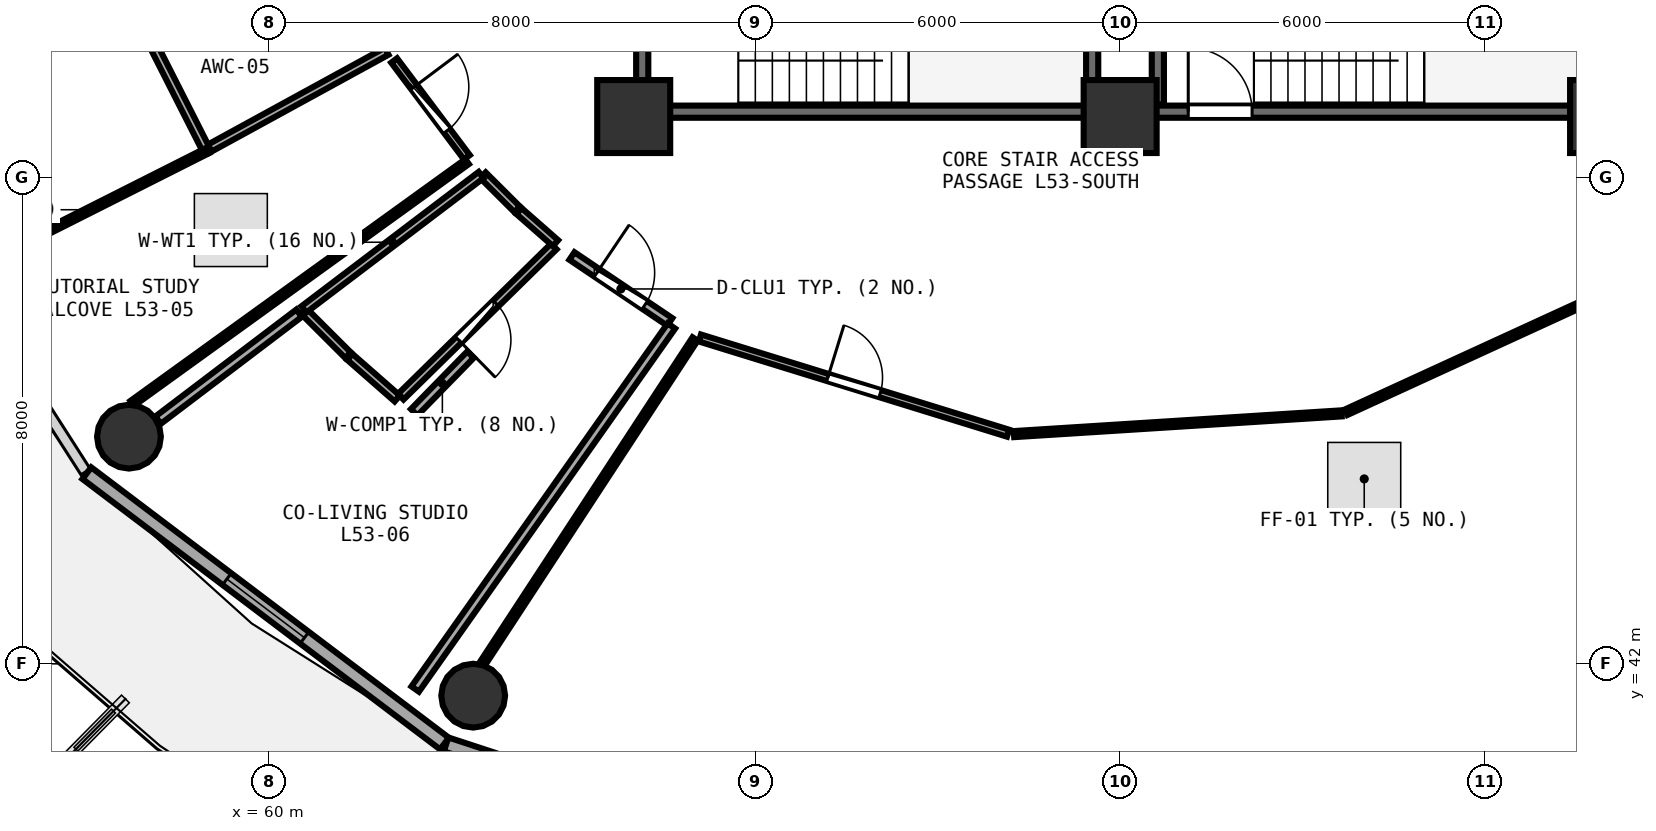
"""IFC4 building model, lengths in metres.
Left out: names, types, materials, properties, quantities, classifications, styles, units other than length and angle.
Written with IfcOpenShell. Run it as: python <this file> out.ifc"""

import sys

from ifc_helpers import new_model, si_unit, direction, frame, frame_2d, origin, origin_2d, place, context, subcontext, project, spatial, rectangle, circle, extrude, element, fill, save


model = new_model("IFC4")
c1 = context("Model", 3, precision=1e-05, world=origin(), true_north=direction((0.0, 1.0)))
c2 = subcontext(c1, "Body", "Model", "MODEL_VIEW")
j1 = project(units=[si_unit("LENGTHUNIT", "METRE"), si_unit("PLANEANGLEUNIT", "RADIAN")], contexts=[c1])
p1 = place(None, origin())
s1 = spatial("IfcSite", under=j1, at=p1, CompositionType="ELEMENT")
p2 = place(p1, origin())
s2 = spatial("IfcBuilding", under=s1, at=p2, CompositionType="ELEMENT")
p3 = place(p2, frame((0.0, 0.0, 208.2)))
s3 = spatial("IfcBuildingStorey", under=s2, at=p3, CompositionType="ELEMENT", Elevation=208.2)
for number, where, z_axis, x_axis in (
    (1, (66.0, 51.0, 0.0), (0.0, 0.0, 1.0), (1.0, 0.0, 0.0)),
    (2, (74.0, 51.0, 0.0), (0.0, 0.0, 1.0), (1.0, 0.0, 0.0)),
    (3, (82.0, 51.0, 0.0), (0.0, 0.0, 1.0), (1.0, 0.0, 0.0)),
):
    element("IfcColumn", number, at=place(p3, frame(where, z_axis=z_axis, x_axis=x_axis)), inside=s3, PredefinedType="PILASTER", context=c2, shape_type="SweptSolid", body=[
        extrude(rectangle(XDim=1.2, YDim=1.2, at=origin_2d()), origin(), (0.0, 0.0, 1.0), 3.75),
    ])
for number, where, z_axis, x_axis in (
    (4, (57.698, 45.736, 0.0), (0.0, 0.0, 1.0), (1.0, 0.0, 0.0)),
    (5, (63.36, 41.476, 0.0), (0.0, 0.0, 1.0), (1.0, 0.0, 0.0)),
):
    element("IfcColumn", number, at=place(p3, frame(where, z_axis=z_axis, x_axis=x_axis)), inside=s3, PredefinedType="COLUMN", context=c2, shape_type="SweptSolid", body=[
        extrude(circle(Radius=0.525, at=origin_2d()), origin(), (0.0, 0.0, 1.0), 3.75),
    ])
p4 = place(p3, frame((57.006, 45.135, 0.0), z_axis=(0.0, 0.0, 1.0), x_axis=(0.797701674595, -0.603052268338, 0.0)))
e6 = element("IfcWall", 6, at=p4, inside=s3, PredefinedType="SOLIDWALL", context=c2, shape_type="SweptSolid", body=[
    extrude(rectangle(XDim=7.374, YDim=0.24, at=frame_2d((3.687, 0.0))), origin(), (0.0, 0.0, 1.0), 3.475),
])
p5 = place(p4, frame((2.887, 0.0, 0.85)))
e7 = element("IfcOpeningElement", 7, at=p5, cuts=e6, PredefinedType="OPENING", context=c2, shape_type="SweptSolid", body=[
    extrude(rectangle(XDim=1.6, YDim=1.45, at=frame_2d((0.8, 0.725))), frame((0.0, 0.13, 0.0), z_axis=(0.0, -1.0, 0.0), x_axis=(1.0, 0.0, 0.0)), (0.0, 0.0, 1.0), 0.26),
])
p6 = place(p3, frame((62.914, 40.675, 0.0), z_axis=(0.0, 0.0, 1.0), x_axis=(0.95022142767, -0.31157541366, 0.0)))
e8 = element("IfcWall", 8, at=p6, inside=s3, PredefinedType="SOLIDWALL", context=c2, shape_type="SweptSolid", body=[
    extrude(rectangle(XDim=7.594, YDim=0.24, at=frame_2d((3.797, 0.0))), origin(), (0.0, 0.0, 1.0), 3.475),
])
p7 = place(p6, frame((2.997, 0.0, 0.85)))
e9 = element("IfcOpeningElement", 9, at=p7, cuts=e8, PredefinedType="OPENING", context=c2, shape_type="SweptSolid", body=[
    extrude(rectangle(XDim=1.6, YDim=1.45, at=frame_2d((0.8, 0.725))), frame((0.0, 0.13, 0.0), z_axis=(0.0, -1.0, 0.0), x_axis=(1.0, 0.0, 0.0)), (0.0, 0.0, 1.0), 0.26),
])
p8 = place(p3, frame((74.0, 51.08, 0.0), z_axis=(0.0, 0.0, 1.0), x_axis=(1.0, 0.0, 0.0)))
e10 = element("IfcWall", 10, at=p8, inside=s3, PredefinedType="SHEAR", context=c2, shape_type="SweptSolid", body=[
    extrude(rectangle(XDim=7.9, YDim=0.2, at=frame_2d((3.95, 0.0))), origin(), (0.0, 0.0, 1.0), 3.49),
])
p9 = place(p8, frame((1.12, 0.0, 0.0)))
e11 = element("IfcOpeningElement", 11, at=p9, cuts=e10, PredefinedType="OPENING", context=c2, shape_type="SweptSolid", body=[
    extrude(rectangle(XDim=1.05, YDim=2.1, at=frame_2d((0.525, 1.05))), frame((0.0, 0.11, 0.0), z_axis=(0.0, -1.0, 0.0), x_axis=(1.0, 0.0, 0.0)), (0.0, 0.0, 1.0), 0.22),
])
p10 = place(p3, frame((74.62, 54.27, 0.0), z_axis=(0.0, 0.0, 1.0), x_axis=(0.0, -1.0, 0.0)))
e12 = element("IfcWall", 12, at=p10, inside=s3, PredefinedType="SHEAR", context=c2, shape_type="SweptSolid", body=[
    extrude(rectangle(XDim=3.07, YDim=0.2, at=frame_2d((1.535, 0.0))), origin(), (0.0, 0.0, 1.0), 3.49),
])
p11 = place(p3, frame((66.26, 51.08, 0.0), z_axis=(0.0, 0.0, 1.0), x_axis=(1.0, 0.0, 0.0)))
e13 = element("IfcWall", 13, at=p11, inside=s3, PredefinedType="SHEAR", context=c2, shape_type="SweptSolid", body=[
    extrude(rectangle(XDim=7.16, YDim=0.2, at=frame_2d((3.58, 0.0))), origin(), (0.0, 0.0, 1.0), 3.49),
])
p12 = place(p3, frame((73.54, 51.2, 0.0), z_axis=(0.0, 0.0, 1.0), x_axis=(0.0, 1.0, 0.0)))
e14 = element("IfcWall", 14, at=p12, inside=s3, PredefinedType="SHEAR", context=c2, shape_type="SweptSolid", body=[
    extrude(rectangle(XDim=3.07, YDim=0.2, at=frame_2d((1.535, 0.0))), origin(), (0.0, 0.0, 1.0), 3.49),
])
p13 = place(p3, frame((66.14, 54.27, 0.0), z_axis=(0.0, 0.0, 1.0), x_axis=(0.0, -1.0, 0.0)))
e15 = element("IfcWall", 15, at=p13, inside=s3, PredefinedType="SHEAR", context=c2, shape_type="SweptSolid", body=[
    extrude(rectangle(XDim=3.07, YDim=0.2, at=frame_2d((1.535, 0.0))), origin(), (0.0, 0.0, 1.0), 3.49),
])
p14 = place(p13, frame((1.01, 0.0, 0.0)))
e16 = element("IfcOpeningElement", 16, at=p14, cuts=e15, PredefinedType="OPENING", context=c2, shape_type="SweptSolid", body=[
    extrude(rectangle(XDim=1.05, YDim=2.1, at=frame_2d((0.525, 1.05))), frame((0.0, 0.11, 0.0), z_axis=(0.0, -1.0, 0.0), x_axis=(1.0, 0.0, 0.0)), (0.0, 0.0, 1.0), 0.22),
])
p15 = place(p3, frame((67.088, 47.358, 0.0), z_axis=(0.0, 0.0, 1.0), x_axis=(0.955451026591, -0.295149683696, 0.0)))
e17 = element("IfcWall", 17, at=p15, inside=s3, PredefinedType="PARTITIONING", context=c2, shape_type="SweptSolid", body=[
    extrude(rectangle(XDim=5.305, YDim=0.12, at=frame_2d((2.652, 0.0))), origin(), (0.0, 0.0, 1.0), 3.235),
])
p16 = place(p15, frame((2.202, 0.0, 0.0)))
e18 = element("IfcOpeningElement", 18, at=p16, cuts=e17, PredefinedType="OPENING", context=c2, shape_type="SweptSolid", body=[
    extrude(rectangle(XDim=0.9, YDim=2.08, at=frame_2d((0.45, 1.04))), frame((0.0, 0.07, 0.0), z_axis=(0.0, -1.0, 0.0), x_axis=(1.0, 0.0, 0.0)), (0.0, 0.0, 1.0), 0.14),
])
p17 = place(p3, frame((62.06, 51.922, 0.0), z_axis=(0.0, 0.0, 1.0), x_axis=(0.600647163637, -0.799514218019, 0.0)))
e19 = element("IfcWall", 19, at=p17, inside=s3, PredefinedType="PARTITIONING", context=c2, shape_type="SweptSolid", body=[
    extrude(rectangle(XDim=1.991, YDim=0.12, at=frame_2d((0.996, 0.0))), origin(), (0.0, 0.0, 1.0), 3.025),
])
p18 = place(p17, frame((0.546, 0.0, 0.0)))
e20 = element("IfcOpeningElement", 20, at=p18, cuts=e19, PredefinedType="OPENING", context=c2, shape_type="SweptSolid", body=[
    extrude(rectangle(XDim=0.9, YDim=2.08, at=frame_2d((0.45, 1.04))), frame((0.0, 0.07, 0.0), z_axis=(0.0, -1.0, 0.0), x_axis=(1.0, 0.0, 0.0)), (0.0, 0.0, 1.0), 0.14),
])
p19 = place(p3, frame((64.686, 48.863, 0.0), z_axis=(0.0, 0.0, 1.0), x_axis=(-0.713685369918, -0.700466410875, 0.0)))
e21 = element("IfcWall", 21, at=p19, inside=s3, PredefinedType="PLUMBINGWALL", context=c2, shape_type="SweptSolid", body=[
    extrude(rectangle(XDim=3.528, YDim=0.13, at=frame_2d((1.764, 0.0))), origin(), (0.0, 0.0, 1.0), 3.175),
])
p20 = place(p19, frame((1.334, 0.0, 0.0)))
e22 = element("IfcOpeningElement", 22, at=p20, cuts=e21, PredefinedType="OPENING", context=c2, shape_type="SweptSolid", body=[
    extrude(rectangle(XDim=0.86, YDim=2.05, at=frame_2d((0.43, 1.025))), frame((0.0, 0.075, 0.0), z_axis=(0.0, -1.0, 0.0), x_axis=(1.0, 0.0, 0.0)), (0.0, 0.0, 1.0), 0.15),
])
p21 = place(p3, frame((64.984, 48.707, 0.0), z_axis=(0.0, 0.0, 1.0), x_axis=(0.829408373073, -0.558642775553, 0.0)))
e23 = element("IfcWall", 23, at=p21, inside=s3, PredefinedType="PARTITIONING", context=c2, shape_type="SweptSolid", body=[
    extrude(rectangle(XDim=1.94, YDim=0.15, at=frame_2d((0.97, 0.0))), origin(), (0.0, 0.0, 1.0), 3.025),
])
p22 = place(p21, frame((0.495, 0.0, 0.0)))
e24 = element("IfcOpeningElement", 24, at=p22, cuts=e23, PredefinedType="OPENING", context=c2, shape_type="SweptSolid", body=[
    extrude(rectangle(XDim=0.95, YDim=2.08, at=frame_2d((0.475, 1.04))), frame((0.0, 0.085, 0.0), z_axis=(0.0, -1.0, 0.0), x_axis=(1.0, 0.0, 0.0)), (0.0, 0.0, 1.0), 0.17),
])
p23 = place(p3, frame((72.254, 45.778, 0.0), z_axis=(0.0, 0.0, 1.0), x_axis=(0.99800477295, 0.063138523658, 0.0)))
e25 = element("IfcWall", 25, at=p23, inside=s3, PredefinedType="PARTITIONING", context=c2, shape_type="SweptSolid", body=[
    extrude(rectangle(XDim=5.398, YDim=0.1, at=frame_2d((2.699, 0.0))), origin(), (0.0, 0.0, 1.0), 3.025),
])
p24 = place(p3, frame((77.717, 46.138, 0.0), z_axis=(0.0, 0.0, 1.0), x_axis=(0.908908137454, 0.416996400069, 0.0)))
e26 = element("IfcWall", 26, at=p24, inside=s3, PredefinedType="PARTITIONING", context=c2, shape_type="SweptSolid", body=[
    extrude(rectangle(XDim=5.289, YDim=0.1, at=frame_2d((2.645, 0.0))), origin(), (0.0, 0.0, 1.0), 3.235),
])
p25 = place(p3, frame((63.514, 42.004, 0.0), z_axis=(0.0, 0.0, 1.0), x_axis=(0.547776057645, 0.836625000028, 0.0)))
e27 = element("IfcWall", 27, at=p25, inside=s3, PredefinedType="PARTITIONING", context=c2, shape_type="SweptSolid", body=[
    extrude(rectangle(XDim=6.381, YDim=0.1, at=frame_2d((3.19, 0.0))), origin(), (0.0, 0.0, 1.0), 3.025),
])
p26 = place(p3, frame((61.052, 53.791, 0.0), z_axis=(0.0, 0.0, 1.0), x_axis=(-0.950863645771, -0.309609959708, 0.0)))
e28 = element("IfcWall", 28, at=p26, inside=s3, PredefinedType="PARTITIONING", context=c2, shape_type="SweptSolid", body=[
    extrude(rectangle(XDim=6.87, YDim=0.1, at=frame_2d((3.435, 0.0))), origin(), (0.0, 0.0, 1.0), 3.175),
])
p27 = place(p3, frame((61.937, 52.073, 0.0), z_axis=(0.0, 0.0, 1.0), x_axis=(-0.877295143091, -0.479951280767, 0.0)))
e29 = element("IfcWall", 29, at=p27, inside=s3, PredefinedType="PLUMBINGWALL", context=c2, shape_type="SweptSolid", body=[
    extrude(rectangle(XDim=3.36, YDim=0.13, at=frame_2d((1.68, 0.0))), origin(), (0.0, 0.0, 1.0), 3.025),
])
p28 = place(p3, frame((58.962, 50.469, 0.0), z_axis=(0.0, 0.0, 1.0), x_axis=(-0.452384505313, 0.891822997771, 0.0)))
e30 = element("IfcWall", 30, at=p28, inside=s3, PredefinedType="PLUMBINGWALL", context=c2, shape_type="SweptSolid", body=[
    extrude(rectangle(XDim=2.018, YDim=0.13, at=frame_2d((1.009, 0.0))), origin(), (0.0, 0.0, 1.0), 3.025),
])
p29 = place(p3, frame((63.26, 50.259, 0.0), z_axis=(0.0, 0.0, 1.0), x_axis=(-0.810850730514, -0.585253016076, 0.0)))
e31 = element("IfcWall", 31, at=p29, inside=s3, PredefinedType="PARTITIONING", context=c2, shape_type="SweptSolid", body=[
    extrude(rectangle(XDim=6.793, YDim=0.1, at=frame_2d((3.396, 0.0))), origin(), (0.0, 0.0, 1.0), 3.175),
])
p30 = place(p3, frame((55.125, 48.491, 0.0), z_axis=(0.0, 0.0, 1.0), x_axis=(0.892902240534, 0.450250584507, 0.0)))
e32 = element("IfcWall", 32, at=p30, inside=s3, PredefinedType="PARTITIONING", context=c2, shape_type="SweptSolid", body=[
    extrude(rectangle(XDim=4.337, YDim=0.1, at=frame_2d((2.169, 0.0))), origin(), (0.0, 0.0, 1.0), 3.075),
])
p31 = place(p3, frame((63.519, 50.036, 0.0), z_axis=(0.0, 0.0, 1.0), x_axis=(0.708179895313, -0.706032036012, 0.0)))
e33 = element("IfcWall", 33, at=p31, inside=s3, PredefinedType="PLUMBINGWALL", context=c2, shape_type="SweptSolid", body=[
    extrude(rectangle(XDim=0.796, YDim=0.13, at=frame_2d((0.398, 0.0))), origin(), (0.0, 0.0, 1.0), 3.025),
])
p32 = place(p3, frame((64.112, 49.447, 0.0), z_axis=(0.0, 0.0, 1.0), x_axis=(0.751480759656, -0.659755005943, 0.0)))
e34 = element("IfcWall", 34, at=p32, inside=s3, PredefinedType="PLUMBINGWALL", context=c2, shape_type="SweptSolid", body=[
    extrude(rectangle(XDim=0.801, YDim=0.13, at=frame_2d((0.401, 0.0))), origin(), (0.0, 0.0, 1.0), 3.48),
])
p33 = place(p3, frame((62.111, 46.363, 0.0), z_axis=(0.0, 0.0, 1.0), x_axis=(-0.751599507382, 0.659619724162, 0.0)))
e35 = element("IfcWall", 35, at=p33, inside=s3, PredefinedType="PLUMBINGWALL", context=c2, shape_type="SweptSolid", body=[
    extrude(rectangle(XDim=1.038, YDim=0.13, at=frame_2d((0.519, 0.0))), origin(), (0.0, 0.0, 1.0), 3.48),
])
p34 = place(p3, frame((61.302, 47.075, 0.0), z_axis=(0.0, 0.0, 1.0), x_axis=(-0.707936648292, 0.706275938996, 0.0)))
e36 = element("IfcWall", 36, at=p34, inside=s3, PredefinedType="PLUMBINGWALL", context=c2, shape_type="SweptSolid", body=[
    extrude(rectangle(XDim=1.029, YDim=0.13, at=frame_2d((0.515, 0.0))), origin(), (0.0, 0.0, 1.0), 3.025),
])
p35 = place(p3, frame((60.575, 47.828, 0.0), z_axis=(0.0, 0.0, 1.0), x_axis=(0.79681650582, 0.604221363453, 0.0)))
e37 = element("IfcWall", 37, at=p35, inside=s3, PredefinedType="PLUMBINGWALL", context=c2, shape_type="SweptSolid", body=[
    extrude(rectangle(XDim=3.657, YDim=0.13, at=frame_2d((1.829, 0.0))), origin(), (0.0, 0.0, 1.0), 3.175),
])
p36 = place(p3, frame((66.62, 47.556, 0.0), z_axis=(0.0, 0.0, 1.0), x_axis=(-0.576552043051, -0.817060427174, 0.0)))
e38 = element("IfcWall", 38, at=p36, inside=s3, PredefinedType="PARTITIONING", context=c2, shape_type="SweptSolid", body=[
    extrude(rectangle(XDim=7.309, YDim=0.15, at=frame_2d((3.654, 0.0))), origin(), (0.0, 0.0, 1.0), 3.025),
])
p37 = place(p3, frame((58.177, 46.007, 0.0), z_axis=(0.0, 0.0, 1.0), x_axis=(0.796666201995, 0.604419525329, 0.0)))
e39 = element("IfcWall", 39, at=p37, inside=s3, PredefinedType="PARTITIONING", context=c2, shape_type="SweptSolid", body=[
    extrude(rectangle(XDim=2.911, YDim=0.15, at=frame_2d((1.455, 0.0))), origin(), (0.0, 0.0, 1.0), 3.025),
])
p38 = place(p3, frame((62.39, 46.137, 0.0), z_axis=(0.0, 0.0, 1.0), x_axis=(0.699044346204, 0.715078318816, 0.0)))
e40 = element("IfcWall", 40, at=p38, inside=s3, PredefinedType="PARTITIONING", context=c2, shape_type="SweptSolid", body=[
    extrude(rectangle(XDim=1.325, YDim=0.15, at=frame_2d((0.662, 0.0))), origin(), (0.0, 0.0, 1.0), 3.175),
])
p39 = place(p5, origin())
e41 = element("IfcWindow", 41, at=p39, inside=s3, PartitioningType="SINGLE_PANEL", PredefinedType="WINDOW", context=c2, shape_type="SweptSolid", body=[
    extrude(rectangle(XDim=1.6, YDim=1.45, at=frame_2d((0.8, 0.725))), frame((0.0, 0.03, 0.0), z_axis=(0.0, -1.0, 0.0), x_axis=(1.0, 0.0, 0.0)), (0.0, 0.0, 1.0), 0.06),
])
fill(e7, e41)
p40 = place(p9, origin())
e42 = element("IfcDoor", 42, at=p40, inside=s3, OperationType="SINGLE_SWING_LEFT", PredefinedType="DOOR", context=c2, shape_type="SweptSolid", body=[
    extrude(rectangle(XDim=1.05, YDim=2.1, at=frame_2d((0.525, 1.05))), frame((0.0, 0.025, 0.0), z_axis=(0.0, -1.0, 0.0), x_axis=(1.0, 0.0, 0.0)), (0.0, 0.0, 1.0), 0.05),
])
fill(e11, e42)
p41 = place(p16, origin())
e43 = element("IfcDoor", 43, at=p41, inside=s3, OperationType="SINGLE_SWING_LEFT", PredefinedType="DOOR", context=c2, shape_type="SweptSolid", body=[
    extrude(rectangle(XDim=0.9, YDim=2.08, at=frame_2d((0.45, 1.04))), frame((0.0, 0.025, 0.0), z_axis=(0.0, -1.0, 0.0), x_axis=(1.0, 0.0, 0.0)), (0.0, 0.0, 1.0), 0.05),
])
fill(e18, e43)
p42 = place(p18, origin())
e44 = element("IfcDoor", 44, at=p42, inside=s3, OperationType="SINGLE_SWING_LEFT", PredefinedType="DOOR", context=c2, shape_type="SweptSolid", body=[
    extrude(rectangle(XDim=0.9, YDim=2.08, at=frame_2d((0.45, 1.04))), frame((0.0, 0.025, 0.0), z_axis=(0.0, -1.0, 0.0), x_axis=(1.0, 0.0, 0.0)), (0.0, 0.0, 1.0), 0.05),
])
fill(e20, e44)
p43 = place(p20, origin())
e45 = element("IfcDoor", 45, at=p43, inside=s3, OperationType="SINGLE_SWING_RIGHT", PredefinedType="DOOR", context=c2, shape_type="SweptSolid", body=[
    extrude(rectangle(XDim=0.86, YDim=2.05, at=frame_2d((0.43, 1.025))), frame((0.0, 0.025, 0.0), z_axis=(0.0, -1.0, 0.0), x_axis=(1.0, 0.0, 0.0)), (0.0, 0.0, 1.0), 0.05),
])
fill(e22, e45)
p44 = place(p22, origin())
e46 = element("IfcDoor", 46, at=p44, inside=s3, OperationType="SINGLE_SWING_LEFT", PredefinedType="DOOR", context=c2, shape_type="SweptSolid", body=[
    extrude(rectangle(XDim=0.95, YDim=2.08, at=frame_2d((0.475, 1.04))), frame((0.0, 0.025, 0.0), z_axis=(0.0, -1.0, 0.0), x_axis=(1.0, 0.0, 0.0)), (0.0, 0.0, 1.0), 0.05),
])
fill(e24, e46)
save(model, sys.argv[1])
